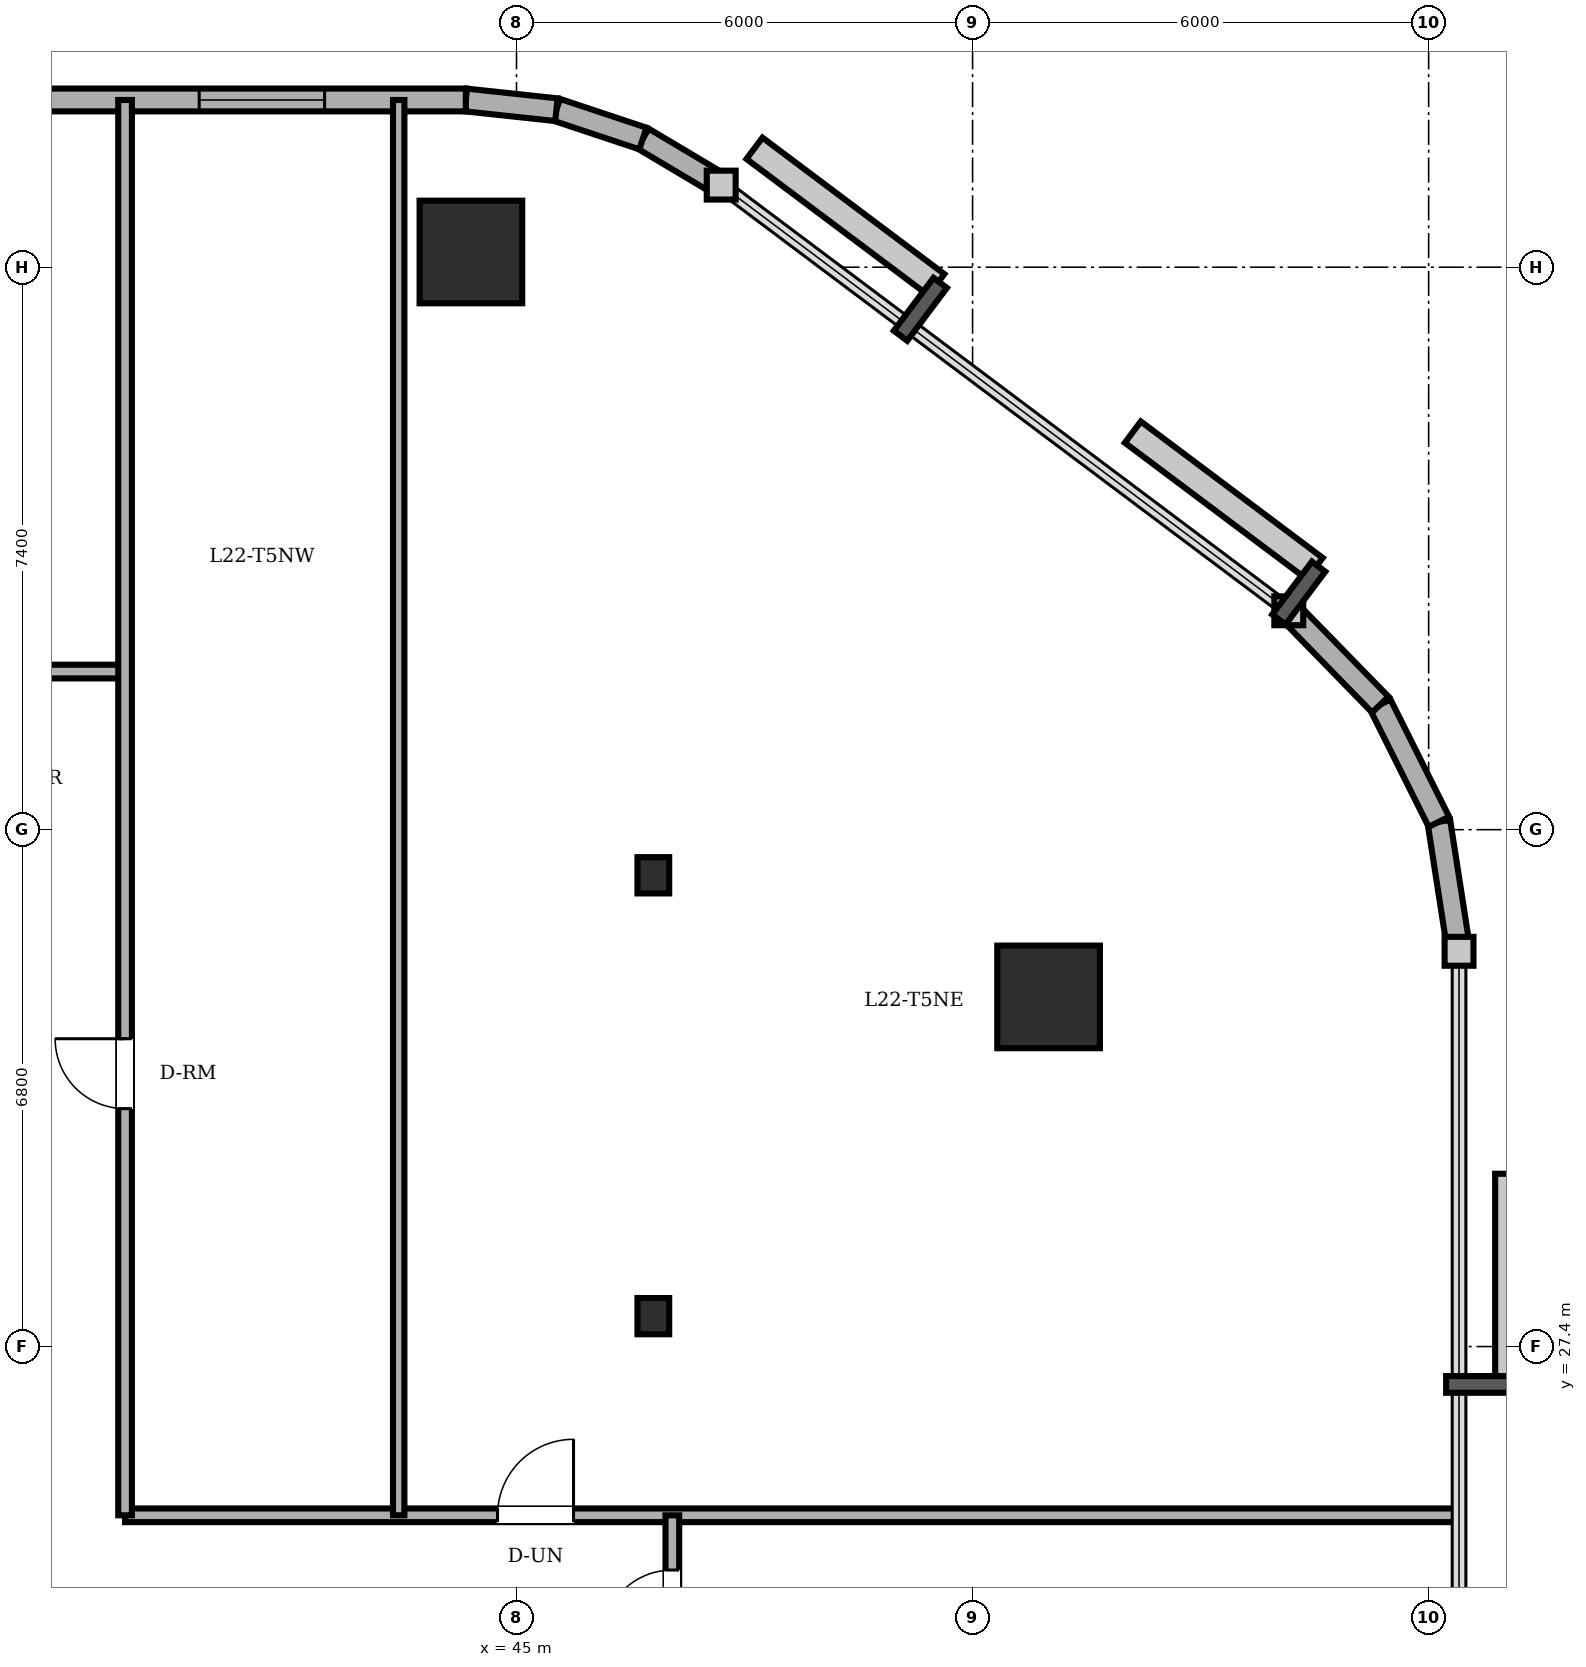
"""IFC4 building model, lengths in metres.
Left out: names, types, materials, properties, quantities, classifications, styles, units other than length and angle.
Written with IfcOpenShell. Run it as: python <this file> out.ifc"""

import sys

from ifc_helpers import new_model, si_unit, direction, frame, frame_2d, origin, origin_2d, place, context, subcontext, project, spatial, rectangle, circle, i_section, extrude, element, fill, save


model = new_model("IFC4")
c1 = context("Model", 3, precision=1e-05, world=origin(), true_north=direction((0.0, 1.0)))
c2 = subcontext(c1, "Body", "Model", "MODEL_VIEW")
j1 = project(units=[si_unit("LENGTHUNIT", "METRE"), si_unit("PLANEANGLEUNIT", "RADIAN")], contexts=[c1])
p1 = place(None, origin())
s1 = spatial("IfcSite", under=j1, at=p1, CompositionType="ELEMENT")
p2 = place(p1, origin())
s2 = spatial("IfcBuilding", under=s1, at=p2, CompositionType="ELEMENT")
p3 = place(p2, frame((0.0, 0.0, 86.3)))
s3 = spatial("IfcBuildingStorey", under=s2, at=p3, CompositionType="ELEMENT", Elevation=86.3)
for number, where, z_axis, x_axis in (
    (1, (52.0, 32.0, 0.0), (0.0, 0.0, 1.0), (1.0, 0.0, 0.0)),
    (2, (44.4, 41.8, 0.0), (0.0, 0.0, 1.0), (1.0, 0.0, 0.0)),
):
    element("IfcColumn", number, at=place(p3, frame(where, z_axis=z_axis, x_axis=x_axis)), inside=s3, PredefinedType="COLUMN", context=c2, shape_type="SweptSolid", body=[
        extrude(circle(Radius=0.675, at=origin_2d()), origin(), (0.0, 0.0, 1.0), 3.6),
    ])
for number, where, z_axis, x_axis in (
    (3, (46.8, 27.8, 0.0), (0.0, 0.0, 1.0), (1.0, 0.0, 0.0)),
    (4, (46.8, 33.6, 0.0), (0.0, 0.0, 1.0), (1.0, 0.0, 0.0)),
):
    element("IfcColumn", number, at=place(p3, frame(where, z_axis=z_axis, x_axis=x_axis)), inside=s3, PredefinedType="COLUMN", context=c2, shape_type="SweptSolid", body=[
        extrude(i_section(OverallWidth=0.417, OverallDepth=0.477, WebThickness=0.036, FlangeThickness=0.057, FilletRadius=0.015, at=origin_2d()), origin(), (0.0, 0.0, 1.0), 3.6),
    ])
p4 = place(p3, frame((57.4, 32.6, 0.0), z_axis=(0.0, 0.0, 1.0), x_axis=(-0.153620989032, 0.988129845581, 0.0)))
e5 = element("IfcWall", 5, at=p4, inside=s3, PredefinedType="SOLIDWALL", context=c2, shape_type="SweptSolid", body=[
    extrude(rectangle(XDim=1.724, YDim=0.3, at=frame_2d((0.862, 0.0))), origin(), (0.0, 0.0, 1.0), 3.4),
])
for number, where, z_axis, x_axis in (
    (6, (57.135, 34.304, 0.0), (0.0, 0.0, 1.0), (-0.447, 0.894, 0.0)),
    (7, (56.364, 35.846, 0.0), (0.0, 0.0, 1.0), (-0.698, 0.716, 0.0)),
):
    element("IfcWall", number, at=place(p3, frame(where, z_axis=z_axis, x_axis=x_axis)), inside=s3, PredefinedType="SOLIDWALL", context=c2, shape_type="SweptSolid", body=[
        extrude(rectangle(XDim=1.724, YDim=0.3, at=frame_2d((0.862, 0.0))), origin(), (0.0, 0.0, 1.0), 3.4),
    ])
p5 = place(p3, frame((47.693, 42.68, 0.0), z_axis=(0.0, 0.0, 1.0), x_axis=(-0.859320591642, 0.511437308749, 0.0)))
e8 = element("IfcWall", 8, at=p5, inside=s3, PredefinedType="SOLIDWALL", context=c2, shape_type="SweptSolid", body=[
    extrude(rectangle(XDim=1.199, YDim=0.3, at=frame_2d((0.599, 0.0))), origin(), (0.0, 0.0, 1.0), 3.4),
])
p6 = place(p3, frame((46.663, 43.293, 0.0), z_axis=(0.0, 0.0, 1.0), x_axis=(-0.948744332129, 0.316044604847, 0.0)))
e9 = element("IfcWall", 9, at=p6, inside=s3, PredefinedType="SOLIDWALL", context=c2, shape_type="SweptSolid", body=[
    extrude(rectangle(XDim=1.2, YDim=0.3, at=frame_2d((0.6, 0.0))), origin(), (0.0, 0.0, 1.0), 3.4),
])
p7 = place(p3, frame((45.525, 43.672, 0.0), z_axis=(0.0, 0.0, 1.0), x_axis=(-0.994289103787, 0.106720092254, 0.0)))
e10 = element("IfcWall", 10, at=p7, inside=s3, PredefinedType="SOLIDWALL", context=c2, shape_type="SweptSolid", body=[
    extrude(rectangle(XDim=1.199, YDim=0.3, at=frame_2d((0.599, 0.0))), origin(), (0.0, 0.0, 1.0), 3.4),
])
p8 = place(p3, frame((44.333, 43.8, 0.0), z_axis=(0.0, 0.0, 1.0), x_axis=(-1.0, 0.0, 0.0)))
e11 = element("IfcWall", 11, at=p8, inside=s3, PredefinedType="SOLIDWALL", context=c2, shape_type="SweptSolid", body=[
    extrude(rectangle(XDim=29.933, YDim=0.3, at=frame_2d((14.967, 0.0))), origin(), (0.0, 0.0, 1.0), 3.4),
])
p9 = place(p8, frame((24.058, 0.0, 0.0)))
e12 = element("IfcOpeningElement", 12, at=p9, cuts=e11, PredefinedType="OPENING", context=c2, shape_type="SweptSolid", body=[
    extrude(rectangle(XDim=0.95, YDim=2.2, at=frame_2d((0.475, 1.1))), frame((0.0, 0.16, 0.0), z_axis=(0.0, -1.0, 0.0), x_axis=(1.0, 0.0, 0.0)), (0.0, 0.0, 1.0), 0.32),
])
p10 = place(p8, frame((1.858, 0.0, 0.85)))
e13 = element("IfcOpeningElement", 13, at=p10, cuts=e11, PredefinedType="OPENING", context=c2, shape_type="SweptSolid", body=[
    extrude(rectangle(XDim=1.65, YDim=1.55, at=frame_2d((0.825, 0.775))), frame((0.0, 0.16, 0.0), z_axis=(0.0, -1.0, 0.0), x_axis=(1.0, 0.0, 0.0)), (0.0, 0.0, 1.0), 0.32),
])
p11 = place(p8, frame((6.808, 0.0, 0.85)))
e14 = element("IfcOpeningElement", 14, at=p11, cuts=e11, PredefinedType="OPENING", context=c2, shape_type="SweptSolid", body=[
    extrude(rectangle(XDim=1.65, YDim=1.55, at=frame_2d((0.825, 0.775))), frame((0.0, 0.16, 0.0), z_axis=(0.0, -1.0, 0.0), x_axis=(1.0, 0.0, 0.0)), (0.0, 0.0, 1.0), 0.32),
])
p12 = place(p8, frame((9.958, 0.0, 0.85)))
e15 = element("IfcOpeningElement", 15, at=p12, cuts=e11, PredefinedType="OPENING", context=c2, shape_type="SweptSolid", body=[
    extrude(rectangle(XDim=1.65, YDim=1.55, at=frame_2d((0.825, 0.775))), frame((0.0, 0.16, 0.0), z_axis=(0.0, -1.0, 0.0), x_axis=(1.0, 0.0, 0.0)), (0.0, 0.0, 1.0), 0.32),
])
p13 = place(p8, frame((15.508, 0.0, 0.85)))
e16 = element("IfcOpeningElement", 16, at=p13, cuts=e11, PredefinedType="OPENING", context=c2, shape_type="SweptSolid", body=[
    extrude(rectangle(XDim=1.65, YDim=1.55, at=frame_2d((0.825, 0.775))), frame((0.0, 0.16, 0.0), z_axis=(0.0, -1.0, 0.0), x_axis=(1.0, 0.0, 0.0)), (0.0, 0.0, 1.0), 0.32),
])
p14 = place(p8, frame((17.908, 0.0, 0.85)))
e17 = element("IfcOpeningElement", 17, at=p14, cuts=e11, PredefinedType="OPENING", context=c2, shape_type="SweptSolid", body=[
    extrude(rectangle(XDim=1.65, YDim=1.55, at=frame_2d((0.825, 0.775))), frame((0.0, 0.16, 0.0), z_axis=(0.0, -1.0, 0.0), x_axis=(1.0, 0.0, 0.0)), (0.0, 0.0, 1.0), 0.32),
])
p15 = place(p8, frame((25.941, 0.0, 0.85)))
e18 = element("IfcOpeningElement", 18, at=p15, cuts=e11, PredefinedType="OPENING", context=c2, shape_type="SweptSolid", body=[
    extrude(rectangle(XDim=1.65, YDim=1.55, at=frame_2d((0.825, 0.775))), frame((0.0, 0.16, 0.0), z_axis=(0.0, -1.0, 0.0), x_axis=(1.0, 0.0, 0.0)), (0.0, 0.0, 1.0), 0.32),
])
p16 = place(p3, frame((39.85, 25.18, 0.0), z_axis=(0.0, 0.0, 1.0), x_axis=(1.0, 0.0, 0.0)))
e19 = element("IfcWall", 19, at=p16, inside=s3, PredefinedType="PARTITIONING", context=c2, shape_type="SweptSolid", body=[
    extrude(rectangle(XDim=17.55, YDim=0.18, at=frame_2d((8.775, 0.0))), origin(), (0.0, 0.0, 1.0), 3.4),
])
p17 = place(p16, frame((4.9, 0.0, 0.0)))
e20 = element("IfcOpeningElement", 20, at=p17, cuts=e19, PredefinedType="OPENING", context=c2, shape_type="SweptSolid", body=[
    extrude(rectangle(XDim=1.0, YDim=2.15, at=frame_2d((0.5, 1.075))), frame((0.0, 0.1, 0.0), z_axis=(0.0, -1.0, 0.0), x_axis=(1.0, 0.0, 0.0)), (0.0, 0.0, 1.0), 0.2),
])
p18 = place(p3, frame((8.8, 36.28, 0.0), z_axis=(0.0, 0.0, 1.0), x_axis=(1.0, 0.0, 0.0)))
e21 = element("IfcWall", 21, at=p18, inside=s3, PredefinedType="PARTITIONING", context=c2, shape_type="SweptSolid", body=[
    extrude(rectangle(XDim=31.05, YDim=0.18, at=frame_2d((15.525, 0.0))), origin(), (0.0, 0.0, 1.0), 3.4),
])
p19 = place(p18, frame((15.65, 0.0, 0.0)))
e22 = element("IfcOpeningElement", 22, at=p19, cuts=e21, PredefinedType="OPENING", context=c2, shape_type="SweptSolid", body=[
    extrude(rectangle(XDim=0.9, YDim=2.1, at=frame_2d((0.45, 1.05))), frame((0.0, 0.1, 0.0), z_axis=(0.0, -1.0, 0.0), x_axis=(1.0, 0.0, 0.0)), (0.0, 0.0, 1.0), 0.2),
])
p20 = place(p18, frame((19.27, 0.0, 0.0)))
e23 = element("IfcOpeningElement", 23, at=p20, cuts=e21, PredefinedType="OPENING", context=c2, shape_type="SweptSolid", body=[
    extrude(rectangle(XDim=0.86, YDim=2.1, at=frame_2d((0.43, 1.05))), frame((0.0, 0.1, 0.0), z_axis=(0.0, -1.0, 0.0), x_axis=(1.0, 0.0, 0.0)), (0.0, 0.0, 1.0), 0.2),
])
p21 = place(p18, frame((7.34, 0.0, 0.0)))
e24 = element("IfcOpeningElement", 24, at=p21, cuts=e21, PredefinedType="OPENING", context=c2, shape_type="SweptSolid", body=[
    extrude(rectangle(XDim=0.92, YDim=2.1, at=frame_2d((0.46, 1.05))), frame((0.0, 0.1, 0.0), z_axis=(0.0, -1.0, 0.0), x_axis=(1.0, 0.0, 0.0)), (0.0, 0.0, 1.0), 0.2),
])
p22 = place(p18, frame((25.605, 0.0, 0.0)))
e25 = element("IfcOpeningElement", 25, at=p22, cuts=e21, PredefinedType="OPENING", context=c2, shape_type="SweptSolid", body=[
    extrude(rectangle(XDim=0.92, YDim=2.1, at=frame_2d((0.46, 1.05))), frame((0.0, 0.1, 0.0), z_axis=(0.0, -1.0, 0.0), x_axis=(1.0, 0.0, 0.0)), (0.0, 0.0, 1.0), 0.2),
])
p23 = place(p3, frame((39.85, 25.18, 0.0), z_axis=(0.0, 0.0, 1.0), x_axis=(0.0, 1.0, 0.0)))
e26 = element("IfcWall", 26, at=p23, inside=s3, PredefinedType="PARTITIONING", context=c2, shape_type="SweptSolid", body=[
    extrude(rectangle(XDim=18.62, YDim=0.18, at=frame_2d((9.31, 0.0))), origin(), (0.0, 0.0, 1.0), 3.4),
])
p24 = place(p23, frame((5.35, 0.0, 0.0)))
e27 = element("IfcOpeningElement", 27, at=p24, cuts=e26, PredefinedType="OPENING", context=c2, shape_type="SweptSolid", body=[
    extrude(rectangle(XDim=0.92, YDim=2.1, at=frame_2d((0.46, 1.05))), frame((0.0, 0.1, 0.0), z_axis=(0.0, -1.0, 0.0), x_axis=(1.0, 0.0, 0.0)), (0.0, 0.0, 1.0), 0.2),
])
p25 = place(p3, frame((43.45, 25.18, 0.0), z_axis=(0.0, 0.0, 1.0), x_axis=(0.0, 1.0, 0.0)))
e28 = element("IfcWall", 28, at=p25, inside=s3, PredefinedType="PARTITIONING", context=c2, shape_type="SweptSolid", body=[
    extrude(rectangle(XDim=18.62, YDim=0.15, at=frame_2d((9.31, 0.0))), origin(), (0.0, 0.0, 1.0), 3.4),
])
p26 = place(p3, frame((47.05, 22.82, 0.0), z_axis=(0.0, 0.0, 1.0), x_axis=(0.0, 1.0, 0.0)))
e29 = element("IfcWall", 29, at=p26, inside=s3, PredefinedType="PARTITIONING", context=c2, shape_type="SweptSolid", body=[
    extrude(rectangle(XDim=2.36, YDim=0.18, at=frame_2d((1.18, 0.0))), origin(), (0.0, 0.0, 1.0), 2.882),
])
p27 = place(p26, frame((0.72, 0.0, 0.0)))
e30 = element("IfcOpeningElement", 30, at=p27, cuts=e29, PredefinedType="OPENING", context=c2, shape_type="SweptSolid", body=[
    extrude(rectangle(XDim=0.92, YDim=2.1, at=frame_2d((0.46, 1.05))), frame((0.0, 0.1, 0.0), z_axis=(0.0, -1.0, 0.0), x_axis=(1.0, 0.0, 0.0)), (0.0, 0.0, 1.0), 0.2),
])
p28 = place(p10, origin())
e31 = element("IfcWindow", 31, at=p28, inside=s3, PartitioningType="DOUBLE_PANEL_VERTICAL", PredefinedType="WINDOW", context=c2, shape_type="SweptSolid", body=[
    extrude(rectangle(XDim=1.65, YDim=1.55, at=frame_2d((0.825, 0.775))), frame((0.0, 0.03, 0.0), z_axis=(0.0, -1.0, 0.0), x_axis=(1.0, 0.0, 0.0)), (0.0, 0.0, 1.0), 0.06),
])
fill(e13, e31)
p29 = place(p24, origin())
e32 = element("IfcDoor", 32, at=p29, inside=s3, OperationType="SINGLE_SWING_RIGHT", PredefinedType="DOOR", context=c2, shape_type="SweptSolid", body=[
    extrude(rectangle(XDim=0.92, YDim=2.1, at=frame_2d((0.46, 1.05))), frame((0.0, 0.025, 0.0), z_axis=(0.0, -1.0, 0.0), x_axis=(1.0, 0.0, 0.0)), (0.0, 0.0, 1.0), 0.05),
])
fill(e27, e32)
p30 = place(p17, origin())
e33 = element("IfcDoor", 33, at=p30, inside=s3, OperationType="SINGLE_SWING_RIGHT", PredefinedType="DOOR", context=c2, shape_type="SweptSolid", body=[
    extrude(rectangle(XDim=1.0, YDim=2.15, at=frame_2d((0.5, 1.075))), frame((0.0, 0.025, 0.0), z_axis=(0.0, -1.0, 0.0), x_axis=(1.0, 0.0, 0.0)), (0.0, 0.0, 1.0), 0.05),
])
fill(e20, e33)
p31 = place(p27, origin())
e34 = element("IfcDoor", 34, at=p31, inside=s3, OperationType="SINGLE_SWING_LEFT", PredefinedType="DOOR", context=c2, shape_type="SweptSolid", body=[
    extrude(rectangle(XDim=0.92, YDim=2.1, at=frame_2d((0.46, 1.05))), frame((0.0, 0.025, 0.0), z_axis=(0.0, -1.0, 0.0), x_axis=(1.0, 0.0, 0.0)), (0.0, 0.0, 1.0), 0.05),
])
fill(e30, e34)
save(model, sys.argv[1])
